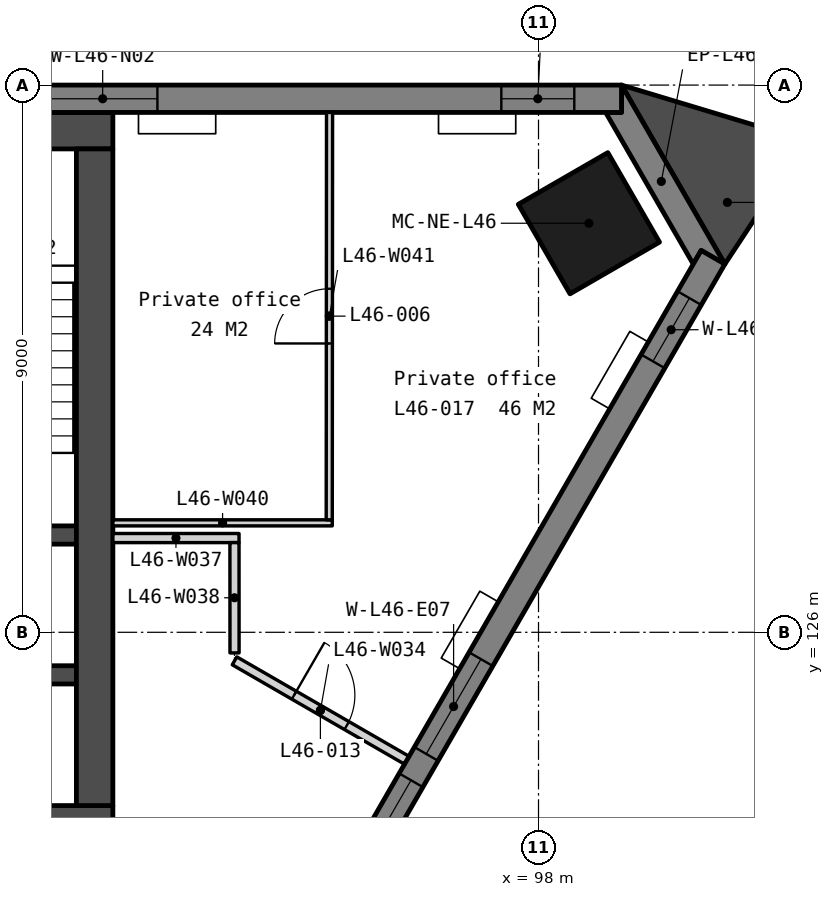
"""IFC4 building model, lengths in metres.
Left out: names, types, materials, properties, quantities, classifications, styles, units other than length and angle.
Written with IfcOpenShell. Run it as: python <this file> out.ifc"""

import sys

from ifc_helpers import new_model, si_unit, direction, frame, frame_2d, origin, origin_2d, place, context, subcontext, project, spatial, polyline, rectangle, outline, extrude, element, fill, save


model = new_model("IFC4")
c1 = context("Model", 3, precision=1e-05, world=origin(), true_north=direction((0.0, 1.0)))
c2 = subcontext(c1, "Body", "Model", "MODEL_VIEW")
j1 = project(units=[si_unit("LENGTHUNIT", "METRE"), si_unit("PLANEANGLEUNIT", "RADIAN")], contexts=[c1])
p1 = place(None, origin())
s1 = spatial("IfcSite", under=j1, at=p1, CompositionType="ELEMENT")
p2 = place(p1, origin())
s2 = spatial("IfcBuilding", under=s1, at=p2, CompositionType="ELEMENT")
p3 = place(p2, frame((0.0, 0.0, 184.1)))
s3 = spatial("IfcBuildingStorey", under=s2, at=p3, CompositionType="ELEMENT", Elevation=184.1)
p4 = place(p3, frame((98.829, 132.728, 0.0), z_axis=(0.0, 0.0, 1.0), x_axis=(-0.5, 0.866025403784, 0.0)))
e1 = element("IfcColumn", 1, at=p4, inside=s3, PredefinedType="COLUMN", context=c2, shape_type="SweptSolid", body=[
    extrude(rectangle(XDim=1.7, YDim=1.7, at=origin_2d()), origin(), (0.0, 0.0, 1.0), 3.9),
])
p5 = place(p3, frame((69.0, 134.25, 0.0), z_axis=(0.0, 0.0, 1.0), x_axis=(1.0, 0.0, 0.0)))
e2 = element("IfcWall", 2, at=p5, inside=s3, PredefinedType="SOLIDWALL", context=c2, shape_type="SweptSolid", body=[
    extrude(rectangle(XDim=22.0, YDim=0.6, at=frame_2d((11.0, 0.0))), origin(), (0.0, 0.0, 1.0), 3.75),
])
p6 = place(p3, frame((69.0, 122.85, 0.0), z_axis=(0.0, 0.0, 1.0), x_axis=(1.0, 0.0, 0.0)))
e3 = element("IfcWall", 3, at=p6, inside=s3, PredefinedType="SOLIDWALL", context=c2, shape_type="SweptSolid", body=[
    extrude(rectangle(XDim=22.0, YDim=0.6, at=frame_2d((11.0, 0.0))), origin(), (0.0, 0.0, 1.0), 3.75),
])
p7 = place(p6, frame((16.375, 0.0, 0.0)))
e4 = element("IfcOpeningElement", 4, at=p7, cuts=e3, PredefinedType="OPENING", context=c2, shape_type="SweptSolid", body=[
    extrude(rectangle(XDim=1.8, YDim=2.1, at=frame_2d((0.9, 1.05))), frame((0.0, 0.31, 0.0), z_axis=(0.0, -1.0, 0.0), x_axis=(1.0, 0.0, 0.0)), (0.0, 0.0, 1.0), 0.62),
])
p8 = place(p6, frame((3.825, 0.0, 0.0)))
e5 = element("IfcOpeningElement", 5, at=p8, cuts=e3, PredefinedType="OPENING", context=c2, shape_type="SweptSolid", body=[
    extrude(rectangle(XDim=1.8, YDim=2.1, at=frame_2d((0.9, 1.05))), frame((0.0, 0.31, 0.0), z_axis=(0.0, -1.0, 0.0), x_axis=(1.0, 0.0, 0.0)), (0.0, 0.0, 1.0), 0.62),
])
p9 = place(p6, frame((12.85, 0.0, 0.0)))
e6 = element("IfcOpeningElement", 6, at=p9, cuts=e3, PredefinedType="OPENING", context=c2, shape_type="SweptSolid", body=[
    extrude(rectangle(XDim=1.5, YDim=2.1, at=frame_2d((0.75, 1.05))), frame((0.0, 0.31, 0.0), z_axis=(0.0, -1.0, 0.0), x_axis=(1.0, 0.0, 0.0)), (0.0, 0.0, 1.0), 0.62),
])
for number, where, z_axis, x_axis in (
    (7, (87.85, 127.6, 0.0), (0.0, 0.0, 1.0), (1.0, 0.0, 0.0)),
    (8, (87.85, 125.3, 0.0), (0.0, 0.0, 1.0), (1.0, 0.0, 0.0)),
):
    element("IfcWall", number, at=place(p3, frame(where, z_axis=z_axis, x_axis=x_axis)), inside=s3, PredefinedType="SOLIDWALL", context=c2, shape_type="SweptSolid", body=[
        extrude(rectangle(XDim=2.55, YDim=0.3, at=frame_2d((1.275, 0.0))), origin(), (0.0, 0.0, 1.0), 3.75),
    ])
p10 = place(p3, frame((90.7, 133.95, 0.0), z_axis=(0.0, 0.0, 1.0), x_axis=(0.0, -1.0, 0.0)))
e9 = element("IfcWall", 9, at=p10, inside=s3, PredefinedType="SOLIDWALL", context=c2, shape_type="SweptSolid", body=[
    extrude(rectangle(XDim=10.8, YDim=0.6, at=frame_2d((5.4, 0.0))), origin(), (0.0, 0.0, 1.0), 3.75),
])
p11 = place(p3, frame((0.0, 0.0, -0.15)))
e10 = element("IfcWall", 10, at=p11, inside=s3, PredefinedType="SOLIDWALL", context=c2, shape_type="SweptSolid", body=[
    extrude(outline(polyline([(101.065, 132.055), (100.675, 132.281), (100.545, 132.055), (99.105, 134.55), (99.365, 134.55), (99.365, 135.0), (101.065, 132.055)])), origin(), (0.0, 0.0, 1.0), 3.9),
])
p12 = place(p3, frame((99.365, 134.775, -0.15), z_axis=(0.0, 0.0, 1.0), x_axis=(-1.0, 0.0, 0.0)))
e11 = element("IfcWall", 11, at=p12, inside=s3, PredefinedType="SOLIDWALL", context=c2, shape_type="SweptSolid", body=[
    extrude(outline(polyline([(38.729, 0.0), (38.729, 3.9), (0.0, 3.9), (0.0, 0.0), (38.729, 0.0)])), frame((0.0, 0.225, 0.0), z_axis=(0.0, -1.0, 0.0), x_axis=(1.0, 0.0, 0.0)), (0.0, 0.0, 1.0), 0.45),
])
p13 = place(p12, frame((0.776, 0.0, 0.95)))
e12 = element("IfcOpeningElement", 12, at=p13, cuts=e11, PredefinedType="OPENING", context=c2, shape_type="SweptSolid", body=[
    extrude(rectangle(XDim=1.2, YDim=2.2, at=frame_2d((0.6, 1.1))), frame((0.0, 0.235, 0.0), z_axis=(0.0, -1.0, 0.0), x_axis=(1.0, 0.0, 0.0)), (0.0, 0.0, 1.0), 0.47),
])
p14 = place(p12, frame((7.632, 0.0, 0.95)))
e13 = element("IfcOpeningElement", 13, at=p14, cuts=e11, PredefinedType="OPENING", context=c2, shape_type="SweptSolid", body=[
    extrude(rectangle(XDim=1.8, YDim=2.2, at=frame_2d((0.9, 1.1))), frame((0.0, 0.235, 0.0), z_axis=(0.0, -1.0, 0.0), x_axis=(1.0, 0.0, 0.0)), (0.0, 0.0, 1.0), 0.47),
])
p15 = place(p12, frame((9.932, 0.0, 0.95)))
e14 = element("IfcOpeningElement", 14, at=p15, cuts=e11, PredefinedType="OPENING", context=c2, shape_type="SweptSolid", body=[
    extrude(rectangle(XDim=1.8, YDim=2.2, at=frame_2d((0.9, 1.1))), frame((0.0, 0.235, 0.0), z_axis=(0.0, -1.0, 0.0), x_axis=(1.0, 0.0, 0.0)), (0.0, 0.0, 1.0), 0.47),
])
p16 = place(p12, frame((17.315, 0.0, 0.95)))
e15 = element("IfcOpeningElement", 15, at=p16, cuts=e11, PredefinedType="OPENING", context=c2, shape_type="SweptSolid", body=[
    extrude(rectangle(XDim=1.8, YDim=2.2, at=frame_2d((0.9, 1.1))), frame((0.0, 0.235, 0.0), z_axis=(0.0, -1.0, 0.0), x_axis=(1.0, 0.0, 0.0)), (0.0, 0.0, 1.0), 0.47),
])
p17 = place(p12, frame((19.615, 0.0, 0.95)))
e16 = element("IfcOpeningElement", 16, at=p17, cuts=e11, PredefinedType="OPENING", context=c2, shape_type="SweptSolid", body=[
    extrude(rectangle(XDim=1.8, YDim=2.2, at=frame_2d((0.9, 1.1))), frame((0.0, 0.235, 0.0), z_axis=(0.0, -1.0, 0.0), x_axis=(1.0, 0.0, 0.0)), (0.0, 0.0, 1.0), 0.47),
])
p18 = place(p12, frame((26.997, 0.0, 0.95)))
e17 = element("IfcOpeningElement", 17, at=p18, cuts=e11, PredefinedType="OPENING", context=c2, shape_type="SweptSolid", body=[
    extrude(rectangle(XDim=1.8, YDim=2.2, at=frame_2d((0.9, 1.1))), frame((0.0, 0.235, 0.0), z_axis=(0.0, -1.0, 0.0), x_axis=(1.0, 0.0, 0.0)), (0.0, 0.0, 1.0), 0.47),
])
p19 = place(p12, frame((29.297, 0.0, 0.95)))
e18 = element("IfcOpeningElement", 18, at=p19, cuts=e11, PredefinedType="OPENING", context=c2, shape_type="SweptSolid", body=[
    extrude(rectangle(XDim=1.8, YDim=2.2, at=frame_2d((0.9, 1.1))), frame((0.0, 0.235, 0.0), z_axis=(0.0, -1.0, 0.0), x_axis=(1.0, 0.0, 0.0)), (0.0, 0.0, 1.0), 0.47),
])
p20 = place(p12, frame((36.753, 0.0, 0.95)))
e19 = element("IfcOpeningElement", 19, at=p20, cuts=e11, PredefinedType="OPENING", context=c2, shape_type="SweptSolid", body=[
    extrude(rectangle(XDim=1.2, YDim=2.2, at=frame_2d((0.6, 1.1))), frame((0.0, 0.235, 0.0), z_axis=(0.0, -1.0, 0.0), x_axis=(1.0, 0.0, 0.0)), (0.0, 0.0, 1.0), 0.47),
])
p21 = place(p3, frame((81.505, 98.627, -0.15), z_axis=(0.0, 0.0, 1.0), x_axis=(0.500002199942, 0.866024133644, 0.0)))
e20 = element("IfcWall", 20, at=p21, inside=s3, PredefinedType="SOLIDWALL", context=c2, shape_type="SweptSolid", body=[
    extrude(outline(polyline([(38.729, 0.0), (38.729, 3.9), (0.0, 3.9), (0.0, 0.0), (38.729, 0.0)])), frame((0.0, 0.225, 0.0), z_axis=(0.0, -1.0, 0.0), x_axis=(1.0, 0.0, 0.0)), (0.0, 0.0, 1.0), 0.45),
])
p22 = place(p21, frame((0.776, 0.0, 0.95)))
e21 = element("IfcOpeningElement", 21, at=p22, cuts=e20, PredefinedType="OPENING", context=c2, shape_type="SweptSolid", body=[
    extrude(rectangle(XDim=1.2, YDim=2.2, at=frame_2d((0.6, 1.1))), frame((0.0, 0.235, 0.0), z_axis=(0.0, -1.0, 0.0), x_axis=(1.0, 0.0, 0.0)), (0.0, 0.0, 1.0), 0.47),
])
p23 = place(p21, frame((7.632, 0.0, 0.95)))
e22 = element("IfcOpeningElement", 22, at=p23, cuts=e20, PredefinedType="OPENING", context=c2, shape_type="SweptSolid", body=[
    extrude(rectangle(XDim=1.8, YDim=2.2, at=frame_2d((0.9, 1.1))), frame((0.0, 0.235, 0.0), z_axis=(0.0, -1.0, 0.0), x_axis=(1.0, 0.0, 0.0)), (0.0, 0.0, 1.0), 0.47),
])
p24 = place(p21, frame((9.932, 0.0, 0.95)))
e23 = element("IfcOpeningElement", 23, at=p24, cuts=e20, PredefinedType="OPENING", context=c2, shape_type="SweptSolid", body=[
    extrude(rectangle(XDim=1.8, YDim=2.2, at=frame_2d((0.9, 1.1))), frame((0.0, 0.235, 0.0), z_axis=(0.0, -1.0, 0.0), x_axis=(1.0, 0.0, 0.0)), (0.0, 0.0, 1.0), 0.47),
])
p25 = place(p21, frame((17.315, 0.0, 0.95)))
e24 = element("IfcOpeningElement", 24, at=p25, cuts=e20, PredefinedType="OPENING", context=c2, shape_type="SweptSolid", body=[
    extrude(rectangle(XDim=1.8, YDim=2.2, at=frame_2d((0.9, 1.1))), frame((0.0, 0.235, 0.0), z_axis=(0.0, -1.0, 0.0), x_axis=(1.0, 0.0, 0.0)), (0.0, 0.0, 1.0), 0.47),
])
p26 = place(p21, frame((19.615, 0.0, 0.95)))
e25 = element("IfcOpeningElement", 25, at=p26, cuts=e20, PredefinedType="OPENING", context=c2, shape_type="SweptSolid", body=[
    extrude(rectangle(XDim=1.8, YDim=2.2, at=frame_2d((0.9, 1.1))), frame((0.0, 0.235, 0.0), z_axis=(0.0, -1.0, 0.0), x_axis=(1.0, 0.0, 0.0)), (0.0, 0.0, 1.0), 0.47),
])
p27 = place(p21, frame((26.997, 0.0, 0.95)))
e26 = element("IfcOpeningElement", 26, at=p27, cuts=e20, PredefinedType="OPENING", context=c2, shape_type="SweptSolid", body=[
    extrude(rectangle(XDim=1.8, YDim=2.2, at=frame_2d((0.9, 1.1))), frame((0.0, 0.235, 0.0), z_axis=(0.0, -1.0, 0.0), x_axis=(1.0, 0.0, 0.0)), (0.0, 0.0, 1.0), 0.47),
])
p28 = place(p21, frame((29.297, 0.0, 0.95)))
e27 = element("IfcOpeningElement", 27, at=p28, cuts=e20, PredefinedType="OPENING", context=c2, shape_type="SweptSolid", body=[
    extrude(rectangle(XDim=1.8, YDim=2.2, at=frame_2d((0.9, 1.1))), frame((0.0, 0.235, 0.0), z_axis=(0.0, -1.0, 0.0), x_axis=(1.0, 0.0, 0.0)), (0.0, 0.0, 1.0), 0.47),
])
p29 = place(p21, frame((36.753, 0.0, 0.95)))
e28 = element("IfcOpeningElement", 28, at=p29, cuts=e20, PredefinedType="OPENING", context=c2, shape_type="SweptSolid", body=[
    extrude(rectangle(XDim=1.2, YDim=2.2, at=frame_2d((0.6, 1.1))), frame((0.0, 0.235, 0.0), z_axis=(0.0, -1.0, 0.0), x_axis=(1.0, 0.0, 0.0)), (0.0, 0.0, 1.0), 0.47),
])
p30 = place(p3, frame((0.0, 0.0, -0.15)))
e29 = element("IfcWall", 29, at=p30, inside=s3, PredefinedType="SOLIDWALL", context=c2, shape_type="SweptSolid", body=[
    extrude(outline(polyline([(101.065, 132.055), (102.402, 134.085), (99.365, 135.0), (101.065, 132.055)])), origin(), (0.0, 0.0, 1.0), 3.9),
])
p31 = place(p3, frame((93.001, 125.531, 0.0), z_axis=(0.0, 0.0, 1.0), x_axis=(0.866032230194, -0.499988176125, 0.0)))
e30 = element("IfcWall", 30, at=p31, inside=s3, PredefinedType="PARTITIONING", context=c2, shape_type="SweptSolid", body=[
    extrude(rectangle(XDim=3.261, YDim=0.15, at=frame_2d((1.63, 0.0))), origin(), (0.0, 0.0, 1.0), 3.75),
])
p32 = place(p31, frame((1.13, 0.0, 0.0)))
e31 = element("IfcOpeningElement", 31, at=p32, cuts=e30, PredefinedType="OPENING", context=c2, shape_type="SweptSolid", body=[
    extrude(rectangle(XDim=1.0, YDim=2.1, at=frame_2d((0.5, 1.05))), frame((0.0, 0.085, 0.0), z_axis=(0.0, -1.0, 0.0), x_axis=(1.0, 0.0, 0.0)), (0.0, 0.0, 1.0), 0.17),
])
p33 = place(p3, frame((91.0, 127.55, 0.0), z_axis=(0.0, 0.0, 1.0), x_axis=(1.0, 0.0, 0.0)))
e32 = element("IfcWall", 32, at=p33, inside=s3, PredefinedType="PARTITIONING", context=c2, shape_type="SweptSolid", body=[
    extrude(rectangle(XDim=2.075, YDim=0.15, at=frame_2d((1.038, 0.0))), origin(), (0.0, 0.0, 1.0), 3.75),
])
p34 = place(p3, frame((93.001, 125.661, 0.0), z_axis=(0.0, 0.0, 1.0), x_axis=(-0.000538285483, 0.999999855124, 0.0)))
e33 = element("IfcWall", 33, at=p34, inside=s3, PredefinedType="PARTITIONING", context=c2, shape_type="SweptSolid", body=[
    extrude(rectangle(XDim=1.814, YDim=0.15, at=frame_2d((0.907, 0.0))), origin(), (0.0, 0.0, 1.0), 3.75),
])
p35 = place(p3, frame((91.0, 127.8, 0.0), z_axis=(0.0, 0.0, 1.0), x_axis=(1.0, 0.0, 0.0)))
e34 = element("IfcWall", 34, at=p35, inside=s3, PredefinedType="PARTITIONING", context=c2, shape_type="SweptSolid", body=[
    extrude(rectangle(XDim=3.608, YDim=0.1, at=frame_2d((1.804, 0.0))), origin(), (0.0, 0.0, 1.0), 3.28),
])
p36 = place(p3, frame((94.559, 127.85, 0.0), z_axis=(0.0, 0.0, 1.0), x_axis=(0.000728783103, 0.999999734438, 0.0)))
e35 = element("IfcWall", 35, at=p36, inside=s3, PredefinedType="PARTITIONING", context=c2, shape_type="SweptSolid", body=[
    extrude(rectangle(XDim=6.7, YDim=0.1, at=frame_2d((3.35, 0.0))), origin(), (0.0, 0.0, 1.0), 3.75),
])
p37 = place(p36, frame((2.9, 0.0, 0.0)))
e36 = element("IfcOpeningElement", 36, at=p37, cuts=e35, PredefinedType="OPENING", context=c2, shape_type="SweptSolid", body=[
    extrude(rectangle(XDim=0.9, YDim=2.1, at=frame_2d((0.45, 1.05))), frame((0.0, 0.06, 0.0), z_axis=(0.0, -1.0, 0.0), x_axis=(1.0, 0.0, 0.0)), (0.0, 0.0, 1.0), 0.12),
])
p38 = place(p13, origin())
e37 = element("IfcWindow", 37, at=p38, inside=s3, PartitioningType="SINGLE_PANEL", PredefinedType="WINDOW", context=c2, shape_type="SweptSolid", body=[
    extrude(rectangle(XDim=1.2, YDim=2.2, at=frame_2d((0.6, 1.1))), frame((0.0, 0.03, 0.0), z_axis=(0.0, -1.0, 0.0), x_axis=(1.0, 0.0, 0.0)), (0.0, 0.0, 1.0), 0.06),
])
fill(e12, e37)
p39 = place(p14, origin())
e38 = element("IfcWindow", 38, at=p39, inside=s3, PartitioningType="SINGLE_PANEL", PredefinedType="WINDOW", context=c2, shape_type="SweptSolid", body=[
    extrude(rectangle(XDim=1.8, YDim=2.2, at=frame_2d((0.9, 1.1))), frame((0.0, 0.03, 0.0), z_axis=(0.0, -1.0, 0.0), x_axis=(1.0, 0.0, 0.0)), (0.0, 0.0, 1.0), 0.06),
])
fill(e13, e38)
p40 = place(p27, origin())
e39 = element("IfcWindow", 39, at=p40, inside=s3, PartitioningType="SINGLE_PANEL", PredefinedType="WINDOW", context=c2, shape_type="SweptSolid", body=[
    extrude(rectangle(XDim=1.8, YDim=2.2, at=frame_2d((0.9, 1.1))), frame((0.0, 0.03, 0.0), z_axis=(0.0, -1.0, 0.0), x_axis=(1.0, 0.0, 0.0)), (0.0, 0.0, 1.0), 0.06),
])
fill(e26, e39)
p41 = place(p28, origin())
e40 = element("IfcWindow", 40, at=p41, inside=s3, PartitioningType="SINGLE_PANEL", PredefinedType="WINDOW", context=c2, shape_type="SweptSolid", body=[
    extrude(rectangle(XDim=1.8, YDim=2.2, at=frame_2d((0.9, 1.1))), frame((0.0, 0.03, 0.0), z_axis=(0.0, -1.0, 0.0), x_axis=(1.0, 0.0, 0.0)), (0.0, 0.0, 1.0), 0.06),
])
fill(e27, e40)
p42 = place(p29, origin())
e41 = element("IfcWindow", 41, at=p42, inside=s3, PartitioningType="SINGLE_PANEL", PredefinedType="WINDOW", context=c2, shape_type="SweptSolid", body=[
    extrude(rectangle(XDim=1.2, YDim=2.2, at=frame_2d((0.6, 1.1))), frame((0.0, 0.03, 0.0), z_axis=(0.0, -1.0, 0.0), x_axis=(1.0, 0.0, 0.0)), (0.0, 0.0, 1.0), 0.06),
])
fill(e28, e41)
p43 = place(p37, origin())
e42 = element("IfcDoor", 42, at=p43, inside=s3, OperationType="SINGLE_SWING_LEFT", PredefinedType="DOOR", context=c2, shape_type="SweptSolid", body=[
    extrude(rectangle(XDim=0.9, YDim=2.1, at=frame_2d((0.45, 1.05))), frame((0.0, 0.025, 0.0), z_axis=(0.0, -1.0, 0.0), x_axis=(1.0, 0.0, 0.0)), (0.0, 0.0, 1.0), 0.05),
])
fill(e36, e42)
p44 = place(p32, origin())
e43 = element("IfcDoor", 43, at=p44, inside=s3, OperationType="SINGLE_SWING_LEFT", PredefinedType="DOOR", context=c2, shape_type="SweptSolid", body=[
    extrude(rectangle(XDim=1.0, YDim=2.1, at=frame_2d((0.5, 1.05))), frame((0.0, 0.025, 0.0), z_axis=(0.0, -1.0, 0.0), x_axis=(1.0, 0.0, 0.0)), (0.0, 0.0, 1.0), 0.05),
])
fill(e31, e43)
save(model, sys.argv[1])
